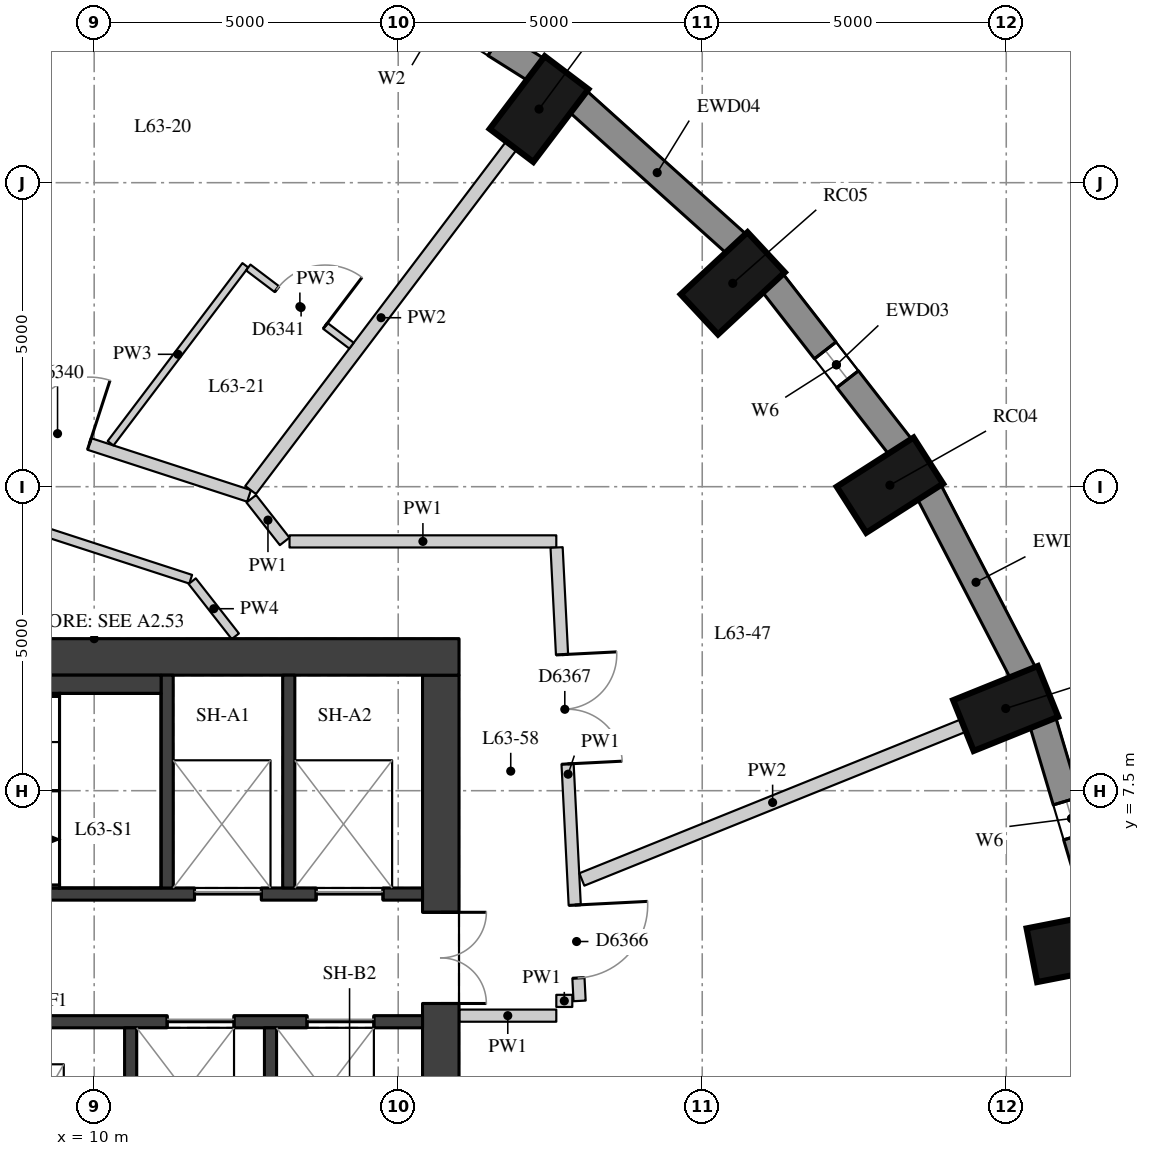
"""IFC4 building model, lengths in metres.
Left out: names, types, materials, properties, quantities, classifications, styles, units other than length and angle.
Written with IfcOpenShell. Run it as: python <this file> out.ifc"""

import sys

from ifc_helpers import new_model, si_unit, direction, frame, frame_2d, origin, origin_2d, place, context, subcontext, project, spatial, rectangle, extrude, element, fill, save


model = new_model("IFC4")
c1 = context("Model", 3, precision=1e-05, world=origin(), true_north=direction((0.0, 1.0)))
c2 = subcontext(c1, "Body", "Model", "MODEL_VIEW")
j1 = project(units=[si_unit("LENGTHUNIT", "METRE"), si_unit("PLANEANGLEUNIT", "RADIAN")], contexts=[c1])
p1 = place(None, origin())
s1 = spatial("IfcSite", under=j1, at=p1, CompositionType="ELEMENT")
p2 = place(p1, origin())
s2 = spatial("IfcBuilding", under=s1, at=p2, CompositionType="ELEMENT")
p3 = place(p2, frame((0.0, 0.0, 222.2)))
s3 = spatial("IfcBuildingStorey", under=s2, at=p3, CompositionType="ELEMENT", Elevation=222.2)
for number, where, z_axis, x_axis in (
    (1, (26.157, 4.937, 0.0), (0.0, 0.0, 1.0), (0.981, 0.192, 0.0)),
    (2, (24.991, 8.852, 0.0), (0.0, 0.0, 1.0), (0.927, 0.374, 0.0)),
    (3, (23.087, 12.525, 0.0), (0.0, 0.0, 1.0), (0.842, 0.539, 0.0)),
    (4, (20.502, 15.845, 0.0), (0.0, 0.0, 1.0), (0.732, 0.681, 0.0)),
    (5, (17.316, 18.71, 0.0), (0.0, 0.0, 1.0), (0.604, 0.797, 0.0)),
):
    element("IfcColumn", number, at=place(p3, frame(where, z_axis=z_axis, x_axis=x_axis)), inside=s3, PredefinedType="COLUMN", context=c2, shape_type="SweptSolid", body=[
        extrude(rectangle(XDim=1.5, YDim=0.9, at=origin_2d()), origin(), (0.0, 0.0, 1.0), 3.3),
    ])
p4 = place(p3, frame((26.548, 5.452, 0.0), z_axis=(0.0, 0.0, 1.0), x_axis=(-0.285444972963, 0.958395099847, 0.0)))
e6 = element("IfcWall", 6, at=p4, inside=s3, PredefinedType="SOLIDWALL", context=c2, shape_type="SweptSolid", body=[
    extrude(rectangle(XDim=3.32, YDim=0.45, at=frame_2d((1.66, 0.0))), origin(), (0.0, 0.0, 1.0), 3.02),
])
p5 = place(p4, frame((1.36, 0.0, 0.4)))
e7 = element("IfcOpeningElement", 7, at=p5, cuts=e6, PredefinedType="OPENING", context=c2, shape_type="SweptSolid", body=[
    extrude(rectangle(XDim=0.6, YDim=1.75, at=frame_2d((0.3, 0.875))), frame((0.0, 0.235, 0.0), z_axis=(0.0, -1.0, 0.0), x_axis=(1.0, 0.0, 0.0)), (0.0, 0.0, 1.0), 0.47),
])
p6 = place(p3, frame((25.278, 9.432, 0.0), z_axis=(0.0, 0.0, 1.0), x_axis=(-0.460175500475, 0.887827972505, 0.0)))
e8 = element("IfcWall", 8, at=p6, inside=s3, PredefinedType="SOLIDWALL", context=c2, shape_type="SweptSolid", body=[
    extrude(rectangle(XDim=3.371, YDim=0.45, at=frame_2d((1.685, 0.0))), origin(), (0.0, 0.0, 1.0), 3.02),
])
p7 = place(p3, frame((23.263, 13.148, 0.0), z_axis=(0.0, 0.0, 1.0), x_axis=(-0.614220816451, 0.789134201919, 0.0)))
e9 = element("IfcWall", 9, at=p7, inside=s3, PredefinedType="SOLIDWALL", context=c2, shape_type="SweptSolid", body=[
    extrude(rectangle(XDim=3.438, YDim=0.45, at=frame_2d((1.719, 0.0))), origin(), (0.0, 0.0, 1.0), 3.02),
])
p8 = place(p7, frame((1.419, 0.0, 0.4)))
e10 = element("IfcOpeningElement", 10, at=p8, cuts=e9, PredefinedType="OPENING", context=c2, shape_type="SweptSolid", body=[
    extrude(rectangle(XDim=0.6, YDim=1.75, at=frame_2d((0.3, 0.875))), frame((0.0, 0.235, 0.0), z_axis=(0.0, -1.0, 0.0), x_axis=(1.0, 0.0, 0.0)), (0.0, 0.0, 1.0), 0.47),
])
p9 = place(p3, frame((20.565, 16.49, 0.0), z_axis=(0.0, 0.0, 1.0), x_axis=(-0.743442727602, 0.668799604348, 0.0)))
e11 = element("IfcWall", 11, at=p9, inside=s3, PredefinedType="SOLIDWALL", context=c2, shape_type="SweptSolid", body=[
    extrude(rectangle(XDim=3.513, YDim=0.45, at=frame_2d((1.756, 0.0))), origin(), (0.0, 0.0, 1.0), 3.02),
])
p10 = place(p3, frame((17.267, 19.358, 0.0), z_axis=(0.0, 0.0, 1.0), x_axis=(-0.846119146727, 0.532993798783, 0.0)))
e12 = element("IfcWall", 12, at=p10, inside=s3, PredefinedType="SOLIDWALL", context=c2, shape_type="SweptSolid", body=[
    extrude(rectangle(XDim=3.587, YDim=0.45, at=frame_2d((1.793, 0.0))), origin(), (0.0, 0.0, 1.0), 3.02),
])
p11 = place(p10, frame((0.793, 0.0, 0.4)))
e13 = element("IfcOpeningElement", 13, at=p11, cuts=e12, PredefinedType="OPENING", context=c2, shape_type="SweptSolid", body=[
    extrude(rectangle(XDim=2.0, YDim=1.75, at=frame_2d((1.0, 0.875))), frame((0.0, 0.235, 0.0), z_axis=(0.0, -1.0, 0.0), x_axis=(1.0, 0.0, 0.0)), (0.0, 0.0, 1.0), 0.47),
])
p12 = place(p3, frame((15.7, -9.4, 0.0), z_axis=(0.0, 0.0, 1.0), x_axis=(0.0, 1.0, 0.0)))
e14 = element("IfcWall", 14, at=p12, inside=s3, PredefinedType="SHEAR", context=c2, shape_type="SweptSolid", body=[
    extrude(rectangle(XDim=18.8, YDim=0.6, at=frame_2d((9.4, 0.0))), origin(), (0.0, 0.0, 1.0), 3.02),
])
p13 = place(p12, frame((13.4, 0.0, 0.0)))
e15 = element("IfcOpeningElement", 15, at=p13, cuts=e14, PredefinedType="OPENING", context=c2, shape_type="SweptSolid", body=[
    extrude(rectangle(XDim=1.5, YDim=2.1, at=frame_2d((0.75, 1.05))), frame((0.0, 0.31, 0.0), z_axis=(0.0, -1.0, 0.0), x_axis=(1.0, 0.0, 0.0)), (0.0, 0.0, 1.0), 0.62),
])
p14 = place(p12, frame((3.9, 0.0, 0.0)))
e16 = element("IfcOpeningElement", 16, at=p14, cuts=e14, PredefinedType="OPENING", context=c2, shape_type="SweptSolid", body=[
    extrude(rectangle(XDim=1.5, YDim=2.1, at=frame_2d((0.75, 1.05))), frame((0.0, 0.31, 0.0), z_axis=(0.0, -1.0, 0.0), x_axis=(1.0, 0.0, 0.0)), (0.0, 0.0, 1.0), 0.62),
])
p15 = place(p3, frame((4.0, 9.7, 0.0), z_axis=(0.0, 0.0, 1.0), x_axis=(1.0, 0.0, 0.0)))
e17 = element("IfcWall", 17, at=p15, inside=s3, PredefinedType="SHEAR", context=c2, shape_type="SweptSolid", body=[
    extrude(rectangle(XDim=12.0, YDim=0.6, at=frame_2d((6.0, 0.0))), origin(), (0.0, 0.0, 1.0), 3.02),
])
p16 = place(p3, frame((4.6, 5.8, 0.0), z_axis=(0.0, 0.0, 1.0), x_axis=(1.0, 0.0, 0.0)))
e18 = element("IfcWall", 18, at=p16, inside=s3, PredefinedType="SHEAR", context=c2, shape_type="SweptSolid", body=[
    extrude(rectangle(XDim=10.8, YDim=0.2, at=frame_2d((5.4, 0.0))), origin(), (0.0, 0.0, 1.0), 3.02),
])
p17 = place(p16, frame((7.05, 0.0, 0.0)))
e19 = element("IfcOpeningElement", 19, at=p17, cuts=e18, PredefinedType="OPENING", context=c2, shape_type="SweptSolid", body=[
    extrude(rectangle(XDim=1.1, YDim=2.1, at=frame_2d((0.55, 1.05))), frame((0.0, 0.11, 0.0), z_axis=(0.0, -1.0, 0.0), x_axis=(1.0, 0.0, 0.0)), (0.0, 0.0, 1.0), 0.22),
])
p18 = place(p16, frame((9.05, 0.0, 0.0)))
e20 = element("IfcOpeningElement", 20, at=p18, cuts=e18, PredefinedType="OPENING", context=c2, shape_type="SweptSolid", body=[
    extrude(rectangle(XDim=1.1, YDim=2.1, at=frame_2d((0.55, 1.05))), frame((0.0, 0.11, 0.0), z_axis=(0.0, -1.0, 0.0), x_axis=(1.0, 0.0, 0.0)), (0.0, 0.0, 1.0), 0.22),
])
p19 = place(p3, frame((4.6, 3.7, 0.0), z_axis=(0.0, 0.0, 1.0), x_axis=(1.0, 0.0, 0.0)))
e21 = element("IfcWall", 21, at=p19, inside=s3, PredefinedType="SHEAR", context=c2, shape_type="SweptSolid", body=[
    extrude(rectangle(XDim=10.8, YDim=0.2, at=frame_2d((5.4, 0.0))), origin(), (0.0, 0.0, 1.0), 3.02),
])
p20 = place(p19, frame((6.6, 0.0, 0.0)))
e22 = element("IfcOpeningElement", 22, at=p20, cuts=e21, PredefinedType="OPENING", context=c2, shape_type="SweptSolid", body=[
    extrude(rectangle(XDim=1.1, YDim=2.1, at=frame_2d((0.55, 1.05))), frame((0.0, 0.11, 0.0), z_axis=(0.0, -1.0, 0.0), x_axis=(1.0, 0.0, 0.0)), (0.0, 0.0, 1.0), 0.22),
])
p21 = place(p19, frame((8.9, 0.0, 0.0)))
e23 = element("IfcOpeningElement", 23, at=p21, cuts=e21, PredefinedType="OPENING", context=c2, shape_type="SweptSolid", body=[
    extrude(rectangle(XDim=1.1, YDim=2.1, at=frame_2d((0.55, 1.05))), frame((0.0, 0.11, 0.0), z_axis=(0.0, -1.0, 0.0), x_axis=(1.0, 0.0, 0.0)), (0.0, 0.0, 1.0), 0.22),
])
for number, where, z_axis, x_axis in (
    (24, (11.2, 5.9, 0.0), (0.0, 0.0, 1.0), (0.0, 1.0, 0.0)),
    (25, (13.2, 5.9, 0.0), (0.0, 0.0, 1.0), (0.0, 1.0, 0.0)),
):
    element("IfcWall", number, at=place(p3, frame(where, z_axis=z_axis, x_axis=x_axis)), inside=s3, PredefinedType="SHEAR", context=c2, shape_type="SweptSolid", body=[
        extrude(rectangle(XDim=3.5, YDim=0.2, at=frame_2d((1.75, 0.0))), origin(), (0.0, 0.0, 1.0), 3.02),
    ])
for number, where, z_axis, x_axis in (
    (26, (10.6, 1.1, 0.0), (0.0, 0.0, 1.0), (0.0, 1.0, 0.0)),
    (27, (12.9, 1.1, 0.0), (0.0, 0.0, 1.0), (0.0, 1.0, 0.0)),
):
    element("IfcWall", number, at=place(p3, frame(where, z_axis=z_axis, x_axis=x_axis)), inside=s3, PredefinedType="SHEAR", context=c2, shape_type="SweptSolid", body=[
        extrude(rectangle(XDim=2.5, YDim=0.2, at=frame_2d((1.25, 0.0))), origin(), (0.0, 0.0, 1.0), 3.02),
    ])
p22 = place(p3, frame((6.22, 9.25, 0.0), z_axis=(0.0, 0.0, 1.0), x_axis=(1.0, 0.0, 0.0)))
e28 = element("IfcWall", 28, at=p22, inside=s3, PredefinedType="PARTITIONING", context=c2, shape_type="SweptSolid", body=[
    extrude(rectangle(XDim=4.88, YDim=0.3, at=frame_2d((2.44, 0.0))), origin(), (0.0, 0.0, 1.0), 3.02),
])
p23 = place(p3, frame((0.795, 16.169, 0.0), z_axis=(0.0, 0.0, 1.0), x_axis=(0.950998491074, -0.309195520626, 0.0)))
e29 = element("IfcWall", 29, at=p23, inside=s3, PredefinedType="PARTITIONING", context=c2, shape_type="SweptSolid", body=[
    extrude(rectangle(XDim=12.357, YDim=0.2, at=frame_2d((6.179, 0.0))), origin(), (0.0, 0.0, 1.0), 3.02),
])
p24 = place(p23, frame((8.496, 0.0, 0.0)))
e30 = element("IfcOpeningElement", 30, at=p24, cuts=e29, PredefinedType="OPENING", context=c2, shape_type="SweptSolid", body=[
    extrude(rectangle(XDim=1.1, YDim=2.1, at=frame_2d((0.55, 1.05))), frame((0.0, 0.11, 0.0), z_axis=(0.0, -1.0, 0.0), x_axis=(1.0, 0.0, 0.0)), (0.0, 0.0, 1.0), 0.22),
])
p25 = place(p23, frame((4.169, 0.0, 0.0)))
e31 = element("IfcOpeningElement", 31, at=p25, cuts=e29, PredefinedType="OPENING", context=c2, shape_type="SweptSolid", body=[
    extrude(rectangle(XDim=0.9, YDim=2.1, at=frame_2d((0.45, 1.05))), frame((0.0, 0.11, 0.0), z_axis=(0.0, -1.0, 0.0), x_axis=(1.0, 0.0, 0.0)), (0.0, 0.0, 1.0), 0.22),
])
p26 = place(p23, frame((0.747, 0.0, 0.0)))
e32 = element("IfcOpeningElement", 32, at=p26, cuts=e29, PredefinedType="OPENING", context=c2, shape_type="SweptSolid", body=[
    extrude(rectangle(XDim=0.9, YDim=2.1, at=frame_2d((0.45, 1.05))), frame((0.0, 0.11, 0.0), z_axis=(0.0, -1.0, 0.0), x_axis=(1.0, 0.0, 0.0)), (0.0, 0.0, 1.0), 0.22),
])
p27 = place(p3, frame((12.583, 12.301, 0.0), z_axis=(0.0, 0.0, 1.0), x_axis=(0.616670471626, -0.787221397972, 0.0)))
e33 = element("IfcWall", 33, at=p27, inside=s3, PredefinedType="PARTITIONING", context=c2, shape_type="SweptSolid", body=[
    extrude(rectangle(XDim=0.89, YDim=0.2, at=frame_2d((0.445, 0.0))), origin(), (0.0, 0.0, 1.0), 3.02),
])
p28 = place(p3, frame((13.213, 11.6, 0.0), z_axis=(0.0, 0.0, 1.0), x_axis=(1.0, 0.0, 0.0)))
e34 = element("IfcWall", 34, at=p28, inside=s3, PredefinedType="PARTITIONING", context=c2, shape_type="SweptSolid", body=[
    extrude(rectangle(XDim=4.387, YDim=0.2, at=frame_2d((2.194, 0.0))), origin(), (0.0, 0.0, 1.0), 3.02),
])
p29 = place(p3, frame((17.605, 11.5, 0.0), z_axis=(0.0, 0.0, 1.0), x_axis=(0.050646981223, -0.998716618112, 0.0)))
e35 = element("IfcWall", 35, at=p29, inside=s3, PredefinedType="PARTITIONING", context=c2, shape_type="SweptSolid", body=[
    extrude(rectangle(XDim=7.467, YDim=0.2, at=frame_2d((3.733, 0.0))), origin(), (0.0, 0.0, 1.0), 3.02),
])
p30 = place(p29, frame((5.889, 0.0, 0.0)))
e36 = element("IfcOpeningElement", 36, at=p30, cuts=e35, PredefinedType="OPENING", context=c2, shape_type="SweptSolid", body=[
    extrude(rectangle(XDim=1.2, YDim=2.1, at=frame_2d((0.6, 1.05))), frame((0.0, 0.11, 0.0), z_axis=(0.0, -1.0, 0.0), x_axis=(1.0, 0.0, 0.0)), (0.0, 0.0, 1.0), 0.22),
])
p31 = place(p29, frame((1.765, 0.0, 0.0)))
e37 = element("IfcOpeningElement", 37, at=p31, cuts=e35, PredefinedType="OPENING", context=c2, shape_type="SweptSolid", body=[
    extrude(rectangle(XDim=1.8, YDim=2.1, at=frame_2d((0.9, 1.05))), frame((0.0, 0.11, 0.0), z_axis=(0.0, -1.0, 0.0), x_axis=(1.0, 0.0, 0.0)), (0.0, 0.0, 1.0), 0.22),
])
p32 = place(p3, frame((17.863, 4.043, 0.0), z_axis=(0.0, 0.0, 1.0), x_axis=(-1.0, 0.0, 0.0)))
e38 = element("IfcWall", 38, at=p32, inside=s3, PredefinedType="PARTITIONING", context=c2, shape_type="SweptSolid", body=[
    extrude(rectangle(XDim=0.263, YDim=0.2, at=frame_2d((0.131, 0.0))), origin(), (0.0, 0.0, 1.0), 3.02),
])
p33 = place(p3, frame((17.6, 3.8, 0.0), z_axis=(0.0, 0.0, 1.0), x_axis=(-1.0, 0.0, 0.0)))
e39 = element("IfcWall", 39, at=p33, inside=s3, PredefinedType="PARTITIONING", context=c2, shape_type="SweptSolid", body=[
    extrude(rectangle(XDim=1.596, YDim=0.2, at=frame_2d((0.798, 0.0))), origin(), (0.0, 0.0, 1.0), 3.02),
])
p34 = place(p3, frame((4.699, 13.218, 0.0), z_axis=(0.0, 0.0, 1.0), x_axis=(0.95099963578, -0.30919199981, 0.0)))
e40 = element("IfcWall", 40, at=p34, inside=s3, PredefinedType="PARTITIONING", context=c2, shape_type="SweptSolid", body=[
    extrude(rectangle(XDim=7.244, YDim=0.15, at=frame_2d((3.622, 0.0))), origin(), (0.0, 0.0, 1.0), 3.02),
])
p35 = place(p3, frame((11.612, 10.946, 0.0), z_axis=(0.0, 0.0, 1.0), x_axis=(0.616228210046, -0.787567643535, 0.0)))
e41 = element("IfcWall", 41, at=p35, inside=s3, PredefinedType="PARTITIONING", context=c2, shape_type="SweptSolid", body=[
    extrude(rectangle(XDim=1.151, YDim=0.15, at=frame_2d((0.576, 0.0))), origin(), (0.0, 0.0, 1.0), 3.02),
])
p36 = place(p3, frame((24.295, 8.571, 0.0), z_axis=(0.0, 0.0, 1.0), x_axis=(-0.927397869515, -0.374076451569, 0.0)))
e42 = element("IfcWall", 42, at=p36, inside=s3, PredefinedType="PARTITIONING", context=c2, shape_type="SweptSolid", body=[
    extrude(rectangle(XDim=6.767, YDim=0.22, at=frame_2d((3.383, 0.0))), origin(), (0.0, 0.0, 1.0), 3.02),
])
p37 = place(p3, frame((16.863, 18.113, 0.0), z_axis=(0.0, 0.0, 1.0), x_axis=(-0.603604387564, -0.79728397909, 0.0)))
e43 = element("IfcWall", 43, at=p37, inside=s3, PredefinedType="PARTITIONING", context=c2, shape_type="SweptSolid", body=[
    extrude(rectangle(XDim=7.108, YDim=0.22, at=frame_2d((3.554, 0.0))), origin(), (0.0, 0.0, 1.0), 3.02),
])
p38 = place(p3, frame((9.307, 22.035, 0.0), z_axis=(0.0, 0.0, 1.0), x_axis=(-0.311971255232, -0.950091540805, 0.0)))
e44 = element("IfcWall", 44, at=p38, inside=s3, PredefinedType="PARTITIONING", context=c2, shape_type="SweptSolid", body=[
    extrude(rectangle(XDim=8.111, YDim=0.22, at=frame_2d((4.055, 0.0))), origin(), (0.0, 0.0, 1.0), 3.02),
])
p39 = place(p3, frame((10.27, 13.214, 0.0), z_axis=(0.0, 0.0, 1.0), x_axis=(0.603632344714, 0.797262812638, 0.0)))
e45 = element("IfcWall", 45, at=p39, inside=s3, PredefinedType="PARTITIONING", context=c2, shape_type="SweptSolid", body=[
    extrude(rectangle(XDim=3.672, YDim=0.12, at=frame_2d((1.836, 0.0))), origin(), (0.0, 0.0, 1.0), 3.02),
])
p40 = place(p3, frame((12.534, 16.105, 0.0), z_axis=(0.0, 0.0, 1.0), x_axis=(0.797282665226, -0.603606123005, 0.0)))
e46 = element("IfcWall", 46, at=p40, inside=s3, PredefinedType="PARTITIONING", context=c2, shape_type="SweptSolid", body=[
    extrude(rectangle(XDim=2.13, YDim=0.12, at=frame_2d((1.065, 0.0))), origin(), (0.0, 0.0, 1.0), 3.02),
])
p41 = place(p40, frame((0.59, 0.0, 0.0)))
e47 = element("IfcOpeningElement", 47, at=p41, cuts=e46, PredefinedType="OPENING", context=c2, shape_type="SweptSolid", body=[
    extrude(rectangle(XDim=1.0, YDim=2.1, at=frame_2d((0.5, 1.05))), frame((0.0, 0.07, 0.0), z_axis=(0.0, -1.0, 0.0), x_axis=(1.0, 0.0, 0.0)), (0.0, 0.0, 1.0), 0.14),
])
p42 = place(p5, origin())
e48 = element("IfcWindow", 48, at=p42, inside=s3, PartitioningType="SINGLE_PANEL", PredefinedType="WINDOW", context=c2, shape_type="SweptSolid", body=[
    extrude(rectangle(XDim=0.6, YDim=1.75, at=frame_2d((0.3, 0.875))), frame((0.0, 0.035, 0.0), z_axis=(0.0, -1.0, 0.0), x_axis=(1.0, 0.0, 0.0)), (0.0, 0.0, 1.0), 0.06),
])
fill(e7, e48)
p43 = place(p8, origin())
e49 = element("IfcWindow", 49, at=p43, inside=s3, PartitioningType="SINGLE_PANEL", PredefinedType="WINDOW", context=c2, shape_type="SweptSolid", body=[
    extrude(rectangle(XDim=0.6, YDim=1.75, at=frame_2d((0.3, 0.875))), frame((0.0, 0.035, 0.0), z_axis=(0.0, -1.0, 0.0), x_axis=(1.0, 0.0, 0.0)), (0.0, 0.0, 1.0), 0.06),
])
fill(e10, e49)
p44 = place(p13, origin())
e50 = element("IfcDoor", 50, at=p44, inside=s3, OperationType="DOUBLE_DOOR_SINGLE_SWING", PredefinedType="DOOR", context=c2, shape_type="SweptSolid", body=[
    extrude(rectangle(XDim=1.5, YDim=2.1, at=frame_2d((0.75, 1.05))), frame((0.0, 0.025, 0.0), z_axis=(0.0, -1.0, 0.0), x_axis=(1.0, 0.0, 0.0)), (0.0, 0.0, 1.0), 0.05),
])
fill(e15, e50)
p45 = place(p17, origin())
e51 = element("IfcDoor", 51, at=p45, inside=s3, OperationType="DOUBLE_DOOR_SLIDING", PredefinedType="DOOR", context=c2, shape_type="SweptSolid", body=[
    extrude(rectangle(XDim=1.1, YDim=2.1, at=frame_2d((0.55, 1.05))), frame((0.0, 0.025, 0.0), z_axis=(0.0, -1.0, 0.0), x_axis=(1.0, 0.0, 0.0)), (0.0, 0.0, 1.0), 0.05),
])
fill(e19, e51)
p46 = place(p18, origin())
e52 = element("IfcDoor", 52, at=p46, inside=s3, OperationType="DOUBLE_DOOR_SLIDING", PredefinedType="DOOR", context=c2, shape_type="SweptSolid", body=[
    extrude(rectangle(XDim=1.1, YDim=2.1, at=frame_2d((0.55, 1.05))), frame((0.0, 0.025, 0.0), z_axis=(0.0, -1.0, 0.0), x_axis=(1.0, 0.0, 0.0)), (0.0, 0.0, 1.0), 0.05),
])
fill(e20, e52)
p47 = place(p20, origin())
e53 = element("IfcDoor", 53, at=p47, inside=s3, OperationType="DOUBLE_DOOR_SLIDING", PredefinedType="DOOR", context=c2, shape_type="SweptSolid", body=[
    extrude(rectangle(XDim=1.1, YDim=2.1, at=frame_2d((0.55, 1.05))), frame((0.0, 0.025, 0.0), z_axis=(0.0, -1.0, 0.0), x_axis=(1.0, 0.0, 0.0)), (0.0, 0.0, 1.0), 0.05),
])
fill(e22, e53)
p48 = place(p21, origin())
e54 = element("IfcDoor", 54, at=p48, inside=s3, OperationType="DOUBLE_DOOR_SLIDING", PredefinedType="DOOR", context=c2, shape_type="SweptSolid", body=[
    extrude(rectangle(XDim=1.1, YDim=2.1, at=frame_2d((0.55, 1.05))), frame((0.0, 0.025, 0.0), z_axis=(0.0, -1.0, 0.0), x_axis=(1.0, 0.0, 0.0)), (0.0, 0.0, 1.0), 0.05),
])
fill(e23, e54)
p49 = place(p24, origin())
e55 = element("IfcDoor", 55, at=p49, inside=s3, OperationType="SINGLE_SWING_RIGHT", PredefinedType="DOOR", context=c2, shape_type="SweptSolid", body=[
    extrude(rectangle(XDim=1.1, YDim=2.1, at=frame_2d((0.55, 1.05))), frame((0.0, 0.025, 0.0), z_axis=(0.0, -1.0, 0.0), x_axis=(1.0, 0.0, 0.0)), (0.0, 0.0, 1.0), 0.05),
])
fill(e30, e55)
p50 = place(p41, origin())
e56 = element("IfcDoor", 56, at=p50, inside=s3, OperationType="SINGLE_SWING_RIGHT", PredefinedType="DOOR", context=c2, shape_type="SweptSolid", body=[
    extrude(rectangle(XDim=1.0, YDim=2.1, at=frame_2d((0.5, 1.05))), frame((0.0, 0.025, 0.0), z_axis=(0.0, -1.0, 0.0), x_axis=(1.0, 0.0, 0.0)), (0.0, 0.0, 1.0), 0.05),
])
fill(e47, e56)
p51 = place(p30, origin())
e57 = element("IfcDoor", 57, at=p51, inside=s3, OperationType="SINGLE_SWING_LEFT", PredefinedType="DOOR", context=c2, shape_type="SweptSolid", body=[
    extrude(rectangle(XDim=1.2, YDim=2.1, at=frame_2d((0.6, 1.05))), frame((0.0, 0.025, 0.0), z_axis=(0.0, -1.0, 0.0), x_axis=(1.0, 0.0, 0.0)), (0.0, 0.0, 1.0), 0.05),
])
fill(e36, e57)
p52 = place(p31, origin())
e58 = element("IfcDoor", 58, at=p52, inside=s3, OperationType="DOUBLE_DOOR_SINGLE_SWING", PredefinedType="DOOR", context=c2, shape_type="SweptSolid", body=[
    extrude(rectangle(XDim=1.8, YDim=2.1, at=frame_2d((0.9, 1.05))), frame((0.0, 0.025, 0.0), z_axis=(0.0, -1.0, 0.0), x_axis=(1.0, 0.0, 0.0)), (0.0, 0.0, 1.0), 0.05),
])
fill(e37, e58)
save(model, sys.argv[1])
